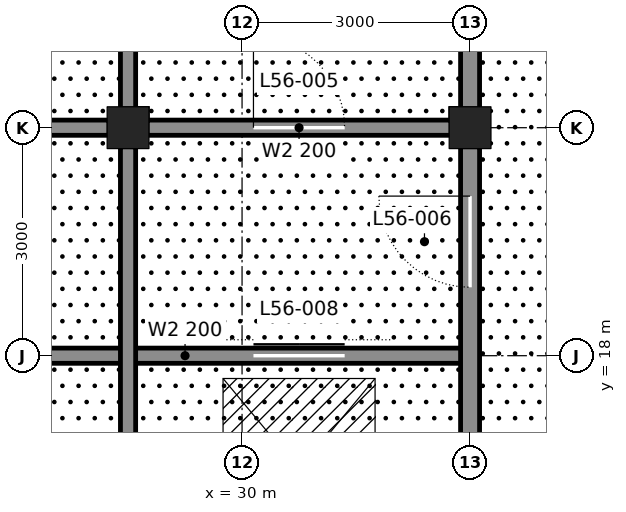
"""IFC4 building model, lengths in metres.
Left out: names, types, materials, properties, quantities, classifications, styles, units other than length and angle.
Written with IfcOpenShell. Run it as: python <this file> out.ifc"""

import sys

from ifc_helpers import new_model, si_unit, direction, frame, frame_2d, origin, origin_2d, place, context, subcontext, project, spatial, rectangle, hollow_rectangle, extrude, element, fill, save


model = new_model("IFC4")
c1 = context("Model", 3, precision=1e-05, world=origin(), true_north=direction((0.0, 1.0)))
c2 = subcontext(c1, "Body", "Model", "MODEL_VIEW")
j1 = project(units=[si_unit("LENGTHUNIT", "METRE"), si_unit("PLANEANGLEUNIT", "RADIAN")], contexts=[c1])
p1 = place(None, origin())
s1 = spatial("IfcSite", under=j1, at=p1, CompositionType="ELEMENT")
p2 = place(p1, origin())
s2 = spatial("IfcBuilding", under=s1, at=p2, CompositionType="ELEMENT")
p3 = place(p2, frame((0.0, 0.0, 251.7)))
s3 = spatial("IfcBuildingStorey", under=s2, at=p3, CompositionType="ELEMENT", Elevation=251.7)
for number, where, z_axis, x_axis in (
    (1, (33.0, 21.0, 0.0), (0.0, 0.0, 1.0), (1.0, 0.0, 0.0)),
    (2, (28.5, 21.0, 0.0), (0.0, 0.0, 1.0), (1.0, 0.0, 0.0)),
):
    element("IfcColumn", number, at=place(p3, frame(where, z_axis=z_axis, x_axis=x_axis)), inside=s3, PredefinedType="COLUMN", context=c2, shape_type="SweptSolid", body=[
        extrude(hollow_rectangle(XDim=0.55, YDim=0.55, WallThickness=0.045, at=origin_2d()), origin(), (0.0, 0.0, 1.0), 6.0),
    ])
p4 = place(p3, frame((25.5, 18.0, 0.0), z_axis=(0.0, 0.0, 1.0), x_axis=(1.0, 0.0, 0.0)))
e3 = element("IfcWall", 3, at=p4, inside=s3, PredefinedType="SOLIDWALL", context=c2, shape_type="SweptSolid", body=[
    extrude(rectangle(XDim=7.5, YDim=0.2, at=frame_2d((3.75, 0.0))), origin(), (0.0, 0.0, 1.0), 5.84),
])
p5 = place(p4, frame((4.65, 0.0, 0.0)))
e4 = element("IfcOpeningElement", 4, at=p5, cuts=e3, PredefinedType="OPENING", context=c2, shape_type="SweptSolid", body=[
    extrude(rectangle(XDim=1.2, YDim=2.1, at=frame_2d((0.6, 1.05))), frame((0.0, 0.11, 0.0), z_axis=(0.0, -1.0, 0.0), x_axis=(1.0, 0.0, 0.0)), (0.0, 0.0, 1.0), 0.22),
])
p6 = place(p3, frame((25.5, 21.0, 0.0), z_axis=(0.0, 0.0, 1.0), x_axis=(1.0, 0.0, 0.0)))
e5 = element("IfcWall", 5, at=p6, inside=s3, PredefinedType="SOLIDWALL", context=c2, shape_type="SweptSolid", body=[
    extrude(rectangle(XDim=2.75, YDim=0.2, at=frame_2d((1.375, 0.0))), origin(), (0.0, 0.0, 1.0), 4.89),
])
p7 = place(p3, frame((28.75, 21.0, 0.0), z_axis=(0.0, 0.0, 1.0), x_axis=(1.0, 0.0, 0.0)))
e6 = element("IfcWall", 6, at=p7, inside=s3, PredefinedType="SOLIDWALL", context=c2, shape_type="SweptSolid", body=[
    extrude(rectangle(XDim=4.0, YDim=0.2, at=frame_2d((2.0, 0.0))), origin(), (0.0, 0.0, 1.0), 4.89),
])
p8 = place(p7, frame((1.4, 0.0, 0.0)))
e7 = element("IfcOpeningElement", 7, at=p8, cuts=e6, PredefinedType="OPENING", context=c2, shape_type="SweptSolid", body=[
    extrude(rectangle(XDim=1.2, YDim=2.1, at=frame_2d((0.6, 1.05))), frame((0.0, 0.11, 0.0), z_axis=(0.0, -1.0, 0.0), x_axis=(1.0, 0.0, 0.0)), (0.0, 0.0, 1.0), 0.22),
])
p9 = place(p3, frame((28.5, 12.25, 0.0), z_axis=(0.0, 0.0, 1.0), x_axis=(0.0, 1.0, 0.0)))
e8 = element("IfcWall", 8, at=p9, inside=s3, PredefinedType="SOLIDWALL", context=c2, shape_type="SweptSolid", body=[
    extrude(rectangle(XDim=8.5, YDim=0.2, at=frame_2d((4.25, 0.0))), origin(), (0.0, 0.0, 1.0), 4.913),
])
p10 = place(p3, frame((28.5, 21.25, 0.0), z_axis=(0.0, 0.0, 1.0), x_axis=(0.0, 1.0, 0.0)))
e9 = element("IfcWall", 9, at=p10, inside=s3, PredefinedType="SOLIDWALL", context=c2, shape_type="SweptSolid", body=[
    extrude(rectangle(XDim=2.5, YDim=0.2, at=frame_2d((1.25, 0.0))), origin(), (0.0, 0.0, 1.0), 4.913),
])
p11 = place(p3, frame((33.0, 12.25, 0.0), z_axis=(0.0, 0.0, 1.0), x_axis=(0.0, 1.0, 0.0)))
e10 = element("IfcWall", 10, at=p11, inside=s3, PredefinedType="SOLIDWALL", context=c2, shape_type="SweptSolid", body=[
    extrude(rectangle(XDim=8.5, YDim=0.25, at=frame_2d((4.25, 0.0))), origin(), (0.0, 0.0, 1.0), 4.913),
])
p12 = place(p11, frame((6.65, 0.0, 0.0)))
e11 = element("IfcOpeningElement", 11, at=p12, cuts=e10, PredefinedType="OPENING", context=c2, shape_type="SweptSolid", body=[
    extrude(rectangle(XDim=1.2, YDim=2.1, at=frame_2d((0.6, 1.05))), frame((0.0, 0.135, 0.0), z_axis=(0.0, -1.0, 0.0), x_axis=(1.0, 0.0, 0.0)), (0.0, 0.0, 1.0), 0.27),
])
p13 = place(p11, frame((0.875, 0.0, 0.0)))
e12 = element("IfcOpeningElement", 12, at=p13, cuts=e10, PredefinedType="OPENING", context=c2, shape_type="SweptSolid", body=[
    extrude(rectangle(XDim=0.75, YDim=2.1, at=frame_2d((0.375, 1.05))), frame((0.0, 0.135, 0.0), z_axis=(0.0, -1.0, 0.0), x_axis=(1.0, 0.0, 0.0)), (0.0, 0.0, 1.0), 0.27),
])
p14 = place(p3, frame((33.0, 21.25, 0.0), z_axis=(0.0, 0.0, 1.0), x_axis=(0.0, 1.0, 0.0)))
e13 = element("IfcWall", 13, at=p14, inside=s3, PredefinedType="SOLIDWALL", context=c2, shape_type="SweptSolid", body=[
    extrude(rectangle(XDim=2.5, YDim=0.25, at=frame_2d((1.25, 0.0))), origin(), (0.0, 0.0, 1.0), 4.913),
])
p15 = place(p8, origin())
e14 = element("IfcDoor", 14, at=p15, inside=s3, OperationType="SINGLE_SWING_LEFT", PredefinedType="DOOR", context=c2, shape_type="SweptSolid", body=[
    extrude(rectangle(XDim=1.2, YDim=2.1, at=frame_2d((0.6, 1.05))), frame((0.0, 0.025, 0.0), z_axis=(0.0, -1.0, 0.0), x_axis=(1.0, 0.0, 0.0)), (0.0, 0.0, 1.0), 0.05),
])
fill(e7, e14)
p16 = place(p12, origin())
e15 = element("IfcDoor", 15, at=p16, inside=s3, OperationType="SINGLE_SWING_RIGHT", PredefinedType="DOOR", context=c2, shape_type="SweptSolid", body=[
    extrude(rectangle(XDim=1.2, YDim=2.1, at=frame_2d((0.6, 1.05))), frame((0.0, 0.025, 0.0), z_axis=(0.0, -1.0, 0.0), x_axis=(1.0, 0.0, 0.0)), (0.0, 0.0, 1.0), 0.05),
])
fill(e11, e15)
p17 = place(p5, origin())
e16 = element("IfcDoor", 16, at=p17, inside=s3, OperationType="DOUBLE_DOOR_SLIDING", PredefinedType="DOOR", context=c2, shape_type="SweptSolid", body=[
    extrude(rectangle(XDim=1.2, YDim=2.1, at=frame_2d((0.6, 1.05))), frame((0.0, 0.025, 0.0), z_axis=(0.0, -1.0, 0.0), x_axis=(1.0, 0.0, 0.0)), (0.0, 0.0, 1.0), 0.05),
])
fill(e4, e16)
save(model, sys.argv[1])
